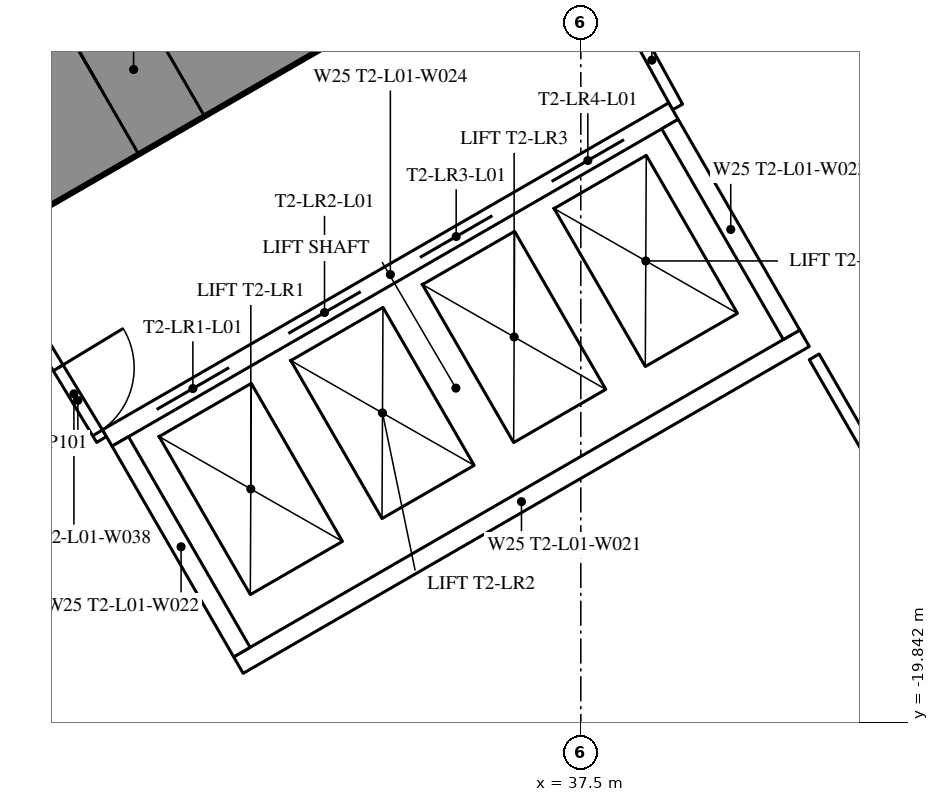
"""IFC4 building model, lengths in metres.
Left out: names, types, materials, properties, quantities, classifications, styles, units other than length and angle.
Written with IfcOpenShell. Run it as: python <this file> out.ifc"""

import sys

from ifc_helpers import new_model, si_unit, direction, frame, frame_2d, origin, place, context, subcontext, project, spatial, rectangle, extrude, element, fill, save


model = new_model("IFC4")
c1 = context("Model", 3, precision=1e-05, world=origin(), true_north=direction((0.0, 1.0)))
c2 = subcontext(c1, "Body", "Model", "MODEL_VIEW")
j1 = project(units=[si_unit("LENGTHUNIT", "METRE"), si_unit("PLANEANGLEUNIT", "RADIAN")], contexts=[c1])
p1 = place(None, origin())
s1 = spatial("IfcSite", under=j1, at=p1, CompositionType="ELEMENT")
p2 = place(p1, origin())
s2 = spatial("IfcBuilding", under=s1, at=p2, CompositionType="ELEMENT")
p3 = place(p2, frame((0.0, 0.0, 7.2)))
s3 = spatial("IfcBuildingStorey", under=s2, at=p3, CompositionType="ELEMENT", Elevation=7.2)
p4 = place(p3, frame((27.2, -13.8, 0.0), z_axis=(0.0, 0.0, 1.0), x_axis=(0.866027159892, 0.499996958321, 0.0)))
e1 = element("IfcWall", 1, at=p4, inside=s3, PredefinedType="SHEAR", context=c2, shape_type="SweptSolid", body=[
    extrude(rectangle(XDim=27.947, YDim=2.0, at=frame_2d((13.973, 0.0))), origin(), (0.0, 0.0, 1.0), 5.4),
])
p5 = place(p4, frame((4.6, 0.0, 0.0)))
e2 = element("IfcOpeningElement", 2, at=p5, cuts=e1, PredefinedType="OPENING", context=c2, shape_type="SweptSolid", body=[
    extrude(rectangle(XDim=1.0, YDim=2.2, at=frame_2d((0.5, 1.1))), frame((0.0, 1.01, 0.0), z_axis=(0.0, -1.0, 0.0), x_axis=(1.0, 0.0, 0.0)), (0.0, 0.0, 1.0), 2.02),
])
p6 = place(p4, frame((13.395, 0.0, 0.0)))
e3 = element("IfcOpeningElement", 3, at=p6, cuts=e1, PredefinedType="OPENING", context=c2, shape_type="SweptSolid", body=[
    extrude(rectangle(XDim=1.8, YDim=2.2, at=frame_2d((0.9, 1.1))), frame((0.0, 1.01, 0.0), z_axis=(0.0, -1.0, 0.0), x_axis=(1.0, 0.0, 0.0)), (0.0, 0.0, 1.0), 2.02),
])
p7 = place(p3, frame((40.57, -15.03, 0.0), z_axis=(0.0, 0.0, 1.0), x_axis=(0.500012993597, -0.866017901798, 0.0)))
e4 = element("IfcWall", 4, at=p7, inside=s3, PredefinedType="PARTITIONING", context=c2, shape_type="SweptSolid", body=[
    extrude(rectangle(XDim=4.243, YDim=0.15, at=frame_2d((2.122, 0.0))), origin(), (0.0, 0.0, 1.0), 5.05),
])
p8 = place(p3, frame((27.5, -16.744, 0.0), z_axis=(0.0, 0.0, 1.0), x_axis=(0.866034395887, 0.499984424899, 0.0)))
e5 = element("IfcWall", 5, at=p8, inside=s3, PredefinedType="PARTITIONING", context=c2, shape_type="SweptSolid", body=[
    extrude(rectangle(XDim=3.469, YDim=0.2, at=frame_2d((1.734, 0.0))), origin(), (0.0, 0.0, 1.0), 5.05),
])
p9 = place(p3, frame((30.467, -14.916, 0.0), z_axis=(0.0, 0.0, 1.0), x_axis=(0.518297865337, -0.855200165334, 0.0)))
e6 = element("IfcWall", 6, at=p9, inside=s3, PredefinedType="PARTITIONING", context=c2, shape_type="SweptSolid", body=[
    extrude(rectangle(XDim=1.405, YDim=0.15, at=frame_2d((0.703, 0.0))), origin(), (0.0, 0.0, 1.0), 5.05),
])
p10 = place(p9, frame((0.303, 0.0, 0.0)))
e7 = element("IfcOpeningElement", 7, at=p10, cuts=e6, PredefinedType="OPENING", context=c2, shape_type="SweptSolid", body=[
    extrude(rectangle(XDim=1.0, YDim=2.2, at=frame_2d((0.5, 1.1))), frame((0.0, 0.085, 0.0), z_axis=(0.0, -1.0, 0.0), x_axis=(1.0, 0.0, 0.0)), (0.0, 0.0, 1.0), 0.17),
])
p11 = place(p3, frame((38.773, -11.742, 0.0), z_axis=(0.0, 0.0, 1.0), x_axis=(-0.481418475768, 0.876490873421, 0.0)))
e8 = element("IfcWall", 8, at=p11, inside=s3, PredefinedType="PARTITIONING", context=c2, shape_type="SweptSolid", body=[
    extrude(rectangle(XDim=1.405, YDim=0.15, at=frame_2d((0.703, 0.0))), origin(), (0.0, 0.0, 1.0), 5.05),
])
p12 = place(p3, frame((31.271, -16.097, 0.0), z_axis=(0.0, 0.0, 1.0), x_axis=(0.86604045752, 0.499973925258, 0.0)))
e9 = element("IfcWall", 9, at=p12, inside=s3, PredefinedType="PARTITIONING", context=c2, shape_type="SweptSolid", body=[
    extrude(rectangle(XDim=8.6, YDim=0.25, at=frame_2d((4.3, 0.0))), origin(), (0.0, 0.0, 1.0), 5.05),
])
p13 = place(p12, frame((0.75, 0.0, 0.0)))
e10 = element("IfcOpeningElement", 10, at=p13, cuts=e9, PredefinedType="OPENING", context=c2, shape_type="SweptSolid", body=[
    extrude(rectangle(XDim=1.1, YDim=2.2, at=frame_2d((0.55, 1.1))), frame((0.0, 0.135, 0.0), z_axis=(0.0, -1.0, 0.0), x_axis=(1.0, 0.0, 0.0)), (0.0, 0.0, 1.0), 0.27),
])
p14 = place(p12, frame((2.75, 0.0, 0.0)))
e11 = element("IfcOpeningElement", 11, at=p14, cuts=e9, PredefinedType="OPENING", context=c2, shape_type="SweptSolid", body=[
    extrude(rectangle(XDim=1.1, YDim=2.2, at=frame_2d((0.55, 1.1))), frame((0.0, 0.135, 0.0), z_axis=(0.0, -1.0, 0.0), x_axis=(1.0, 0.0, 0.0)), (0.0, 0.0, 1.0), 0.27),
])
p15 = place(p12, frame((4.75, 0.0, 0.0)))
e12 = element("IfcOpeningElement", 12, at=p15, cuts=e9, PredefinedType="OPENING", context=c2, shape_type="SweptSolid", body=[
    extrude(rectangle(XDim=1.1, YDim=2.2, at=frame_2d((0.55, 1.1))), frame((0.0, 0.135, 0.0), z_axis=(0.0, -1.0, 0.0), x_axis=(1.0, 0.0, 0.0)), (0.0, 0.0, 1.0), 0.27),
])
p16 = place(p12, frame((6.75, 0.0, 0.0)))
e13 = element("IfcOpeningElement", 13, at=p16, cuts=e9, PredefinedType="OPENING", context=c2, shape_type="SweptSolid", body=[
    extrude(rectangle(XDim=1.1, YDim=2.2, at=frame_2d((0.55, 1.1))), frame((0.0, 0.135, 0.0), z_axis=(0.0, -1.0, 0.0), x_axis=(1.0, 0.0, 0.0)), (0.0, 0.0, 1.0), 0.27),
])
p17 = place(p3, frame((32.996, -19.086, 0.0), z_axis=(0.0, 0.0, 1.0), x_axis=(0.866028165386, 0.499995216735, 0.0)))
e14 = element("IfcWall", 14, at=p17, inside=s3, PredefinedType="PARTITIONING", context=c2, shape_type="SweptSolid", body=[
    extrude(rectangle(XDim=8.6, YDim=0.25, at=frame_2d((4.3, 0.0))), origin(), (0.0, 0.0, 1.0), 5.05),
])
for number, where, z_axis, x_axis in (
    (15, (31.441, -16.143, 0.0), (0.0, 0.0, 1.0), (0.5, -0.866, 0.0)),
    (16, (38.673, -11.968, 0.0), (0.0, 0.0, 1.0), (0.5, -0.866, 0.0)),
):
    element("IfcWall", number, at=place(p3, frame(where, z_axis=z_axis, x_axis=x_axis)), inside=s3, PredefinedType="PARTITIONING", context=c2, shape_type="SweptSolid", body=[
        extrude(rectangle(XDim=3.201, YDim=0.25, at=frame_2d((1.6, 0.0))), origin(), (0.0, 0.0, 1.0), 5.05),
    ])
p18 = place(p10, origin())
e17 = element("IfcDoor", 17, at=p18, inside=s3, OperationType="SINGLE_SWING_LEFT", PredefinedType="DOOR", context=c2, shape_type="SweptSolid", body=[
    extrude(rectangle(XDim=1.0, YDim=2.2, at=frame_2d((0.5, 1.1))), frame((0.0, 0.025, 0.0), z_axis=(0.0, -1.0, 0.0), x_axis=(1.0, 0.0, 0.0)), (0.0, 0.0, 1.0), 0.05),
])
fill(e7, e17)
p19 = place(p5, origin())
e18 = element("IfcDoor", 18, at=p19, inside=s3, OperationType="SINGLE_SWING_LEFT", PredefinedType="DOOR", context=c2, shape_type="SweptSolid", body=[
    extrude(rectangle(XDim=1.0, YDim=2.2, at=frame_2d((0.5, 1.1))), frame((0.0, 0.025, 0.0), z_axis=(0.0, -1.0, 0.0), x_axis=(1.0, 0.0, 0.0)), (0.0, 0.0, 1.0), 0.05),
])
fill(e2, e18)
p20 = place(p13, origin())
e19 = element("IfcDoor", 19, at=p20, inside=s3, OperationType="DOUBLE_DOOR_SLIDING", PredefinedType="USERDEFINED", context=c2, shape_type="SweptSolid", body=[
    extrude(rectangle(XDim=1.1, YDim=2.2, at=frame_2d((0.55, 1.1))), frame((0.0, 0.025, 0.0), z_axis=(0.0, -1.0, 0.0), x_axis=(1.0, 0.0, 0.0)), (0.0, 0.0, 1.0), 0.05),
])
fill(e10, e19)
p21 = place(p14, origin())
e20 = element("IfcDoor", 20, at=p21, inside=s3, OperationType="DOUBLE_DOOR_SLIDING", PredefinedType="USERDEFINED", context=c2, shape_type="SweptSolid", body=[
    extrude(rectangle(XDim=1.1, YDim=2.2, at=frame_2d((0.55, 1.1))), frame((0.0, 0.025, 0.0), z_axis=(0.0, -1.0, 0.0), x_axis=(1.0, 0.0, 0.0)), (0.0, 0.0, 1.0), 0.05),
])
fill(e11, e20)
p22 = place(p15, origin())
e21 = element("IfcDoor", 21, at=p22, inside=s3, OperationType="DOUBLE_DOOR_SLIDING", PredefinedType="USERDEFINED", context=c2, shape_type="SweptSolid", body=[
    extrude(rectangle(XDim=1.1, YDim=2.2, at=frame_2d((0.55, 1.1))), frame((0.0, 0.025, 0.0), z_axis=(0.0, -1.0, 0.0), x_axis=(1.0, 0.0, 0.0)), (0.0, 0.0, 1.0), 0.05),
])
fill(e12, e21)
p23 = place(p16, origin())
e22 = element("IfcDoor", 22, at=p23, inside=s3, OperationType="DOUBLE_DOOR_SLIDING", PredefinedType="USERDEFINED", context=c2, shape_type="SweptSolid", body=[
    extrude(rectangle(XDim=1.1, YDim=2.2, at=frame_2d((0.55, 1.1))), frame((0.0, 0.025, 0.0), z_axis=(0.0, -1.0, 0.0), x_axis=(1.0, 0.0, 0.0)), (0.0, 0.0, 1.0), 0.05),
])
fill(e13, e22)
save(model, sys.argv[1])
